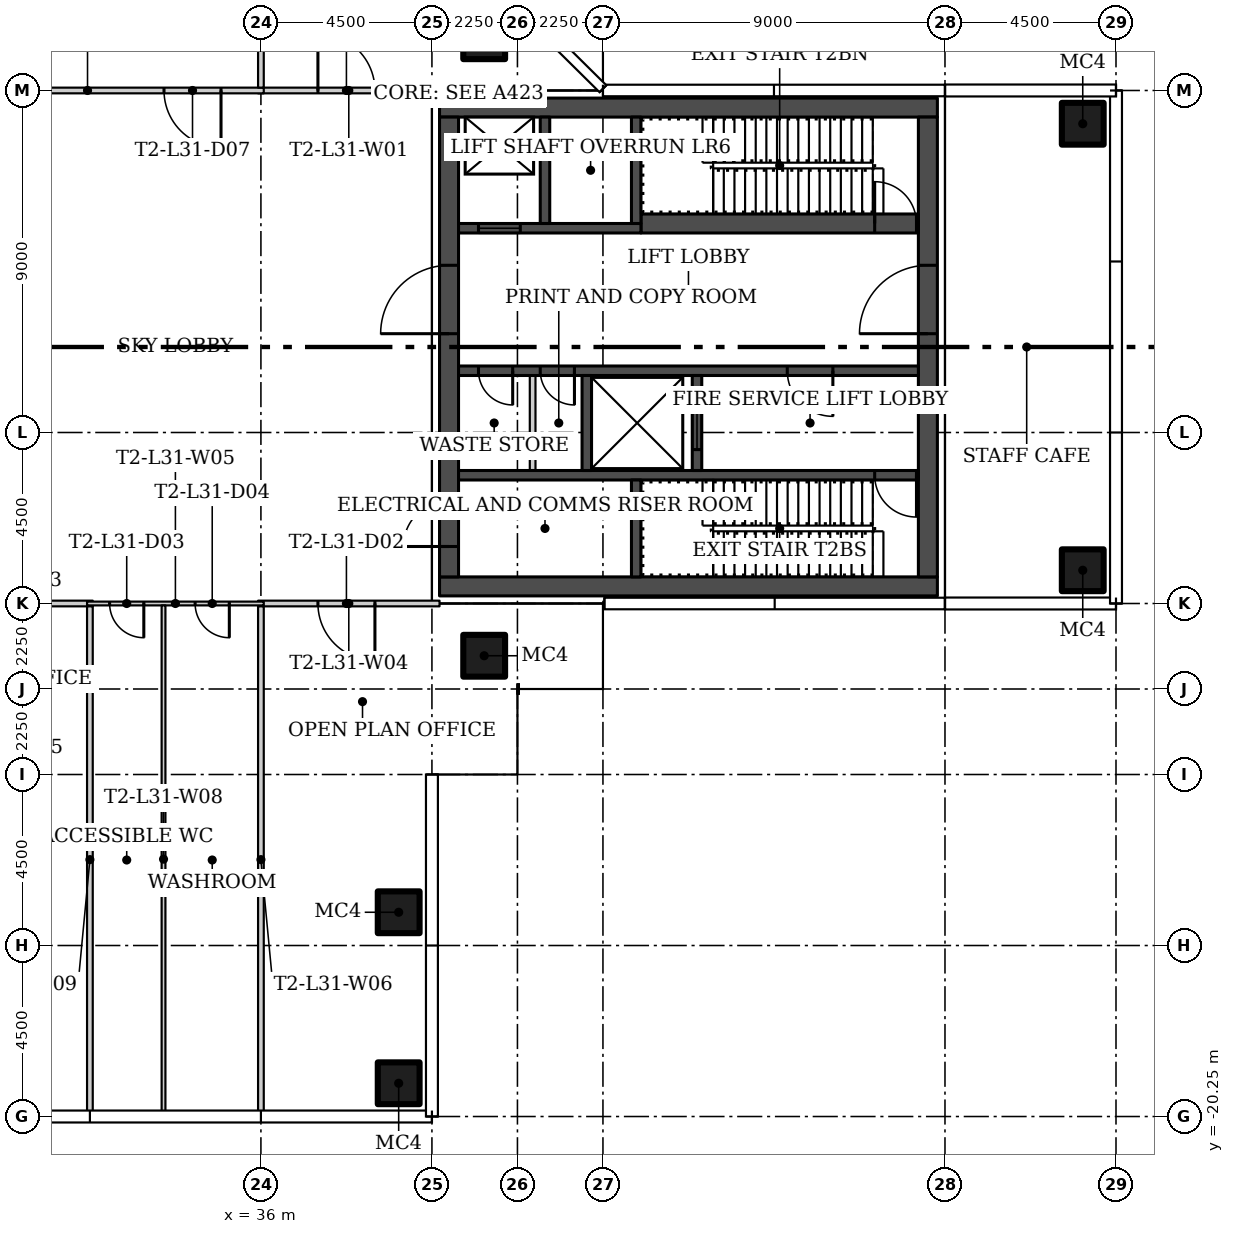
"""IFC4 building model, lengths in metres.
Left out: names, types, materials, properties, quantities, classifications, styles, units other than length and angle.
Written with IfcOpenShell. Run it as: python <this file> out.ifc"""

import sys

from ifc_helpers import new_model, si_unit, direction, frame, frame_2d, origin, origin_2d, place, context, subcontext, project, spatial, rectangle, hollow_rectangle, extrude, element, fill, save


model = new_model("IFC4")
c1 = context("Model", 3, precision=1e-05, world=origin(), true_north=direction((0.0, 1.0)))
c2 = subcontext(c1, "Body", "Model", "MODEL_VIEW")
j1 = project(units=[si_unit("LENGTHUNIT", "METRE"), si_unit("PLANEANGLEUNIT", "RADIAN")], contexts=[c1])
p1 = place(None, origin())
s1 = spatial("IfcSite", under=j1, at=p1, CompositionType="ELEMENT")
p2 = place(p1, origin())
s2 = spatial("IfcBuilding", under=s1, at=p2, CompositionType="ELEMENT")
p3 = place(p2, frame((0.0, 0.0, 133.5)))
s3 = spatial("IfcBuildingStorey", under=s2, at=p3, CompositionType="ELEMENT", Elevation=133.5)
for number, where in (
    (1, (41.875, 8.125, 0.0)),
    (2, (41.875, -8.125, 0.0)),
    (3, (39.625, -14.875, 0.0)),
    (4, (39.625, -19.375, 0.0)),
    (5, (57.625, -5.875, 0.0)),
    (6, (57.625, 5.875, 0.0)),
):
    element("IfcColumn", number, at=place(p3, frame(where)), inside=s3, PredefinedType="COLUMN", context=c2, shape_type="SweptSolid", body=[
        extrude(hollow_rectangle(XDim=1.1, YDim=1.1, WallThickness=0.04, at=origin_2d()), origin(), (0.0, 0.0, 1.0), 5.05),
    ])
p4 = place(p3, frame((35.925, 6.75, 0.0)))
e7 = element("IfcWall", 7, at=p4, inside=s3, PredefinedType="PARTITIONING", context=c2, shape_type="SweptSolid", body=[
    extrude(rectangle(XDim=4.775, YDim=0.15, at=frame_2d((2.387, 0.0))), origin(), (0.0, 0.0, 1.0), 5.05),
])
p5 = place(p4, frame((1.575, 0.0, 0.0)))
e8 = element("IfcOpeningElement", 8, at=p5, cuts=e7, PredefinedType="OPENING", context=c2, shape_type="SweptSolid", body=[
    extrude(rectangle(XDim=1.5, YDim=2.1, at=frame_2d((0.75, 1.05))), frame((0.0, 0.085, 0.0), z_axis=(0.0, -1.0, 0.0), x_axis=(1.0, 0.0, 0.0)), (0.0, 0.0, 1.0), 0.17),
])
p6 = place(p3, frame((36.075, 6.75, 0.0), z_axis=(0.0, 0.0, 1.0), x_axis=(-1.0, 0.0, 0.0)))
e9 = element("IfcWall", 9, at=p6, inside=s3, PredefinedType="PARTITIONING", context=c2, shape_type="SweptSolid", body=[
    extrude(rectangle(XDim=9.275, YDim=0.15, at=frame_2d((4.637, 0.0))), origin(), (0.0, 0.0, 1.0), 5.05),
])
p7 = place(p6, frame((6.525, 0.0, 0.0)))
e10 = element("IfcOpeningElement", 10, at=p7, cuts=e9, PredefinedType="OPENING", context=c2, shape_type="SweptSolid", body=[
    extrude(rectangle(XDim=1.5, YDim=2.1, at=frame_2d((0.75, 1.05))), frame((0.0, 0.085, 0.0), z_axis=(0.0, -1.0, 0.0), x_axis=(1.0, 0.0, 0.0)), (0.0, 0.0, 1.0), 0.17),
])
p8 = place(p6, frame((1.125, 0.0, 0.0)))
e11 = element("IfcOpeningElement", 11, at=p8, cuts=e9, PredefinedType="OPENING", context=c2, shape_type="SweptSolid", body=[
    extrude(rectangle(XDim=1.5, YDim=2.1, at=frame_2d((0.75, 1.05))), frame((0.0, 0.085, 0.0), z_axis=(0.0, -1.0, 0.0), x_axis=(1.0, 0.0, 0.0)), (0.0, 0.0, 1.0), 0.17),
])
p9 = place(p3, frame((31.575, -6.75, 0.0), z_axis=(0.0, 0.0, 1.0), x_axis=(-1.0, 0.0, 0.0)))
e12 = element("IfcWall", 12, at=p9, inside=s3, PredefinedType="PARTITIONING", context=c2, shape_type="SweptSolid", body=[
    extrude(rectangle(XDim=4.775, YDim=0.15, at=frame_2d((2.387, 0.0))), origin(), (0.0, 0.0, 1.0), 5.05),
])
p10 = place(p9, frame((1.575, 0.0, 0.0)))
e13 = element("IfcOpeningElement", 13, at=p10, cuts=e12, PredefinedType="OPENING", context=c2, shape_type="SweptSolid", body=[
    extrude(rectangle(XDim=1.5, YDim=2.1, at=frame_2d((0.75, 1.05))), frame((0.0, 0.085, 0.0), z_axis=(0.0, -1.0, 0.0), x_axis=(1.0, 0.0, 0.0)), (0.0, 0.0, 1.0), 0.17),
])
p11 = place(p3, frame((40.7, -6.75, 0.0), z_axis=(0.0, 0.0, 1.0), x_axis=(-1.0, 0.0, 0.0)))
e14 = element("IfcWall", 14, at=p11, inside=s3, PredefinedType="PARTITIONING", context=c2, shape_type="SweptSolid", body=[
    extrude(rectangle(XDim=4.775, YDim=0.15, at=frame_2d((2.387, 0.0))), origin(), (0.0, 0.0, 1.0), 5.05),
])
p12 = place(p11, frame((1.7, 0.0, 0.0)))
e15 = element("IfcOpeningElement", 15, at=p12, cuts=e14, PredefinedType="OPENING", context=c2, shape_type="SweptSolid", body=[
    extrude(rectangle(XDim=1.5, YDim=2.1, at=frame_2d((0.75, 1.05))), frame((0.0, 0.085, 0.0), z_axis=(0.0, -1.0, 0.0), x_axis=(1.0, 0.0, 0.0)), (0.0, 0.0, 1.0), 0.17),
])
p13 = place(p3, frame((36.075, -6.75, 0.0), z_axis=(0.0, 0.0, 1.0), x_axis=(-1.0, 0.0, 0.0)))
e16 = element("IfcWall", 16, at=p13, inside=s3, PredefinedType="PARTITIONING", context=c2, shape_type="SweptSolid", body=[
    extrude(rectangle(XDim=4.65, YDim=0.1, at=frame_2d((2.325, 0.0))), origin(), (0.0, 0.0, 1.0), 5.05),
])
p14 = place(p13, frame((3.156, 0.0, 0.0)))
e17 = element("IfcOpeningElement", 17, at=p14, cuts=e16, PredefinedType="OPENING", context=c2, shape_type="SweptSolid", body=[
    extrude(rectangle(XDim=0.9, YDim=2.1, at=frame_2d((0.45, 1.05))), frame((0.0, 0.06, 0.0), z_axis=(0.0, -1.0, 0.0), x_axis=(1.0, 0.0, 0.0)), (0.0, 0.0, 1.0), 0.12),
])
p15 = place(p13, frame((0.906, 0.0, 0.0)))
e18 = element("IfcOpeningElement", 18, at=p15, cuts=e16, PredefinedType="OPENING", context=c2, shape_type="SweptSolid", body=[
    extrude(rectangle(XDim=0.9, YDim=2.1, at=frame_2d((0.45, 1.05))), frame((0.0, 0.06, 0.0), z_axis=(0.0, -1.0, 0.0), x_axis=(1.0, 0.0, 0.0)), (0.0, 0.0, 1.0), 0.12),
])
for number, where, z_axis, x_axis in (
    (19, (36.0, -6.825, 0.0), (0.0, 0.0, 1.0), (0.0, -1.0, 0.0)),
    (20, (36.0, 20.155, 0.0), (0.0, 0.0, 1.0), (0.0, -1.0, 0.0)),
):
    element("IfcWall", number, at=place(p3, frame(where, z_axis=z_axis, x_axis=x_axis)), inside=s3, PredefinedType="PARTITIONING", context=c2, shape_type="SweptSolid", body=[
        extrude(rectangle(XDim=13.33, YDim=0.15, at=frame_2d((6.665, 0.0))), origin(), (0.0, 0.0, 1.0), 5.05),
    ])
p16 = place(p3, frame((33.438, -6.8, 0.0), z_axis=(0.0, 0.0, 1.0), x_axis=(0.0, -1.0, 0.0)))
e21 = element("IfcWall", 21, at=p16, inside=s3, PredefinedType="PARTITIONING", context=c2, shape_type="SweptSolid", body=[
    extrude(rectangle(XDim=13.355, YDim=0.1, at=frame_2d((6.677, 0.0))), origin(), (0.0, 0.0, 1.0), 5.05),
])
p17 = place(p3, frame((31.5, -6.825, 0.0), z_axis=(0.0, 0.0, 1.0), x_axis=(0.0, -1.0, 0.0)))
e22 = element("IfcWall", 22, at=p17, inside=s3, PredefinedType="PARTITIONING", context=c2, shape_type="SweptSolid", body=[
    extrude(rectangle(XDim=13.33, YDim=0.15, at=frame_2d((6.665, 0.0))), origin(), (0.0, 0.0, 1.0), 5.05),
])
for number, where, z_axis, x_axis in (
    (23, (53.8, -6.3, 0.0), (0.0, 0.0, 1.0), (-1.0, 0.0, 0.0)),
    (24, (53.8, 6.3, 0.0), (0.0, 0.0, 1.0), (-1.0, 0.0, 0.0)),
):
    element("IfcWall", number, at=place(p3, frame(where, z_axis=z_axis, x_axis=x_axis)), inside=s3, PredefinedType="SHEAR", context=c2, shape_type="SweptSolid", body=[
        extrude(rectangle(XDim=13.1, YDim=0.5, at=frame_2d((6.55, 0.0))), origin(), (0.0, 0.0, 1.0), 5.05),
    ])
p18 = place(p3, frame((53.55, -6.05, 0.0), z_axis=(0.0, 0.0, 1.0), x_axis=(0.0, 1.0, 0.0)))
e25 = element("IfcWall", 25, at=p18, inside=s3, PredefinedType="SHEAR", context=c2, shape_type="SweptSolid", body=[
    extrude(rectangle(XDim=12.1, YDim=0.5, at=frame_2d((6.05, 0.0))), origin(), (0.0, 0.0, 1.0), 5.05),
])
p19 = place(p18, frame((6.4, 0.0, 0.0)))
e26 = element("IfcOpeningElement", 26, at=p19, cuts=e25, PredefinedType="OPENING", context=c2, shape_type="SweptSolid", body=[
    extrude(rectangle(XDim=1.8, YDim=2.4, at=frame_2d((0.9, 1.2))), frame((0.0, 0.26, 0.0), z_axis=(0.0, -1.0, 0.0), x_axis=(1.0, 0.0, 0.0)), (0.0, 0.0, 1.0), 0.52),
])
p20 = place(p3, frame((40.95, -6.05, 0.0), z_axis=(0.0, 0.0, 1.0), x_axis=(0.0, 1.0, 0.0)))
e27 = element("IfcWall", 27, at=p20, inside=s3, PredefinedType="SHEAR", context=c2, shape_type="SweptSolid", body=[
    extrude(rectangle(XDim=12.1, YDim=0.5, at=frame_2d((6.05, 0.0))), origin(), (0.0, 0.0, 1.0), 5.05),
])
p21 = place(p20, frame((0.8, 0.0, 0.0)))
e28 = element("IfcOpeningElement", 28, at=p21, cuts=e27, PredefinedType="OPENING", context=c2, shape_type="SweptSolid", body=[
    extrude(rectangle(XDim=1.2, YDim=2.1, at=frame_2d((0.6, 1.05))), frame((0.0, 0.26, 0.0), z_axis=(0.0, -1.0, 0.0), x_axis=(1.0, 0.0, 0.0)), (0.0, 0.0, 1.0), 0.52),
])
p22 = place(p20, frame((6.4, 0.0, 0.0)))
e29 = element("IfcOpeningElement", 29, at=p22, cuts=e27, PredefinedType="OPENING", context=c2, shape_type="SweptSolid", body=[
    extrude(rectangle(XDim=1.8, YDim=2.4, at=frame_2d((0.9, 1.2))), frame((0.0, 0.26, 0.0), z_axis=(0.0, -1.0, 0.0), x_axis=(1.0, 0.0, 0.0)), (0.0, 0.0, 1.0), 0.52),
])
p23 = place(p3, frame((53.3, -3.375, 0.0), z_axis=(0.0, 0.0, 1.0), x_axis=(-1.0, 0.0, 0.0)))
e30 = element("IfcWall", 30, at=p23, inside=s3, PredefinedType="SHEAR", context=c2, shape_type="SweptSolid", body=[
    extrude(rectangle(XDim=12.1, YDim=0.25, at=frame_2d((6.05, 0.0))), origin(), (0.0, 0.0, 1.0), 5.05),
])
p24 = place(p23, frame((0.05, 0.0, 0.0)))
e31 = element("IfcOpeningElement", 31, at=p24, cuts=e30, PredefinedType="OPENING", context=c2, shape_type="SweptSolid", body=[
    extrude(rectangle(XDim=1.1, YDim=2.1, at=frame_2d((0.55, 1.05))), frame((0.0, 0.135, 0.0), z_axis=(0.0, -1.0, 0.0), x_axis=(1.0, 0.0, 0.0)), (0.0, 0.0, 1.0), 0.27),
])
p25 = place(p3, frame((45.875, -6.05, 0.0), z_axis=(0.0, 0.0, 1.0), x_axis=(0.0, 1.0, 0.0)))
e32 = element("IfcWall", 32, at=p25, inside=s3, PredefinedType="SHEAR", context=c2, shape_type="SweptSolid", body=[
    extrude(rectangle(XDim=2.55, YDim=0.25, at=frame_2d((1.275, 0.0))), origin(), (0.0, 0.0, 1.0), 5.05),
])
p26 = place(p3, frame((53.3, -0.625, 0.0), z_axis=(0.0, 0.0, 1.0), x_axis=(-1.0, 0.0, 0.0)))
e33 = element("IfcWall", 33, at=p26, inside=s3, PredefinedType="SHEAR", context=c2, shape_type="SweptSolid", body=[
    extrude(rectangle(XDim=12.1, YDim=0.25, at=frame_2d((6.05, 0.0))), origin(), (0.0, 0.0, 1.0), 5.05),
])
p27 = place(p26, frame((2.25, 0.0, 0.0)))
e34 = element("IfcOpeningElement", 34, at=p27, cuts=e33, PredefinedType="OPENING", context=c2, shape_type="SweptSolid", body=[
    extrude(rectangle(XDim=1.2, YDim=2.1, at=frame_2d((0.6, 1.05))), frame((0.0, 0.135, 0.0), z_axis=(0.0, -1.0, 0.0), x_axis=(1.0, 0.0, 0.0)), (0.0, 0.0, 1.0), 0.27),
])
p28 = place(p26, frame((9.05, 0.0, 0.0)))
e35 = element("IfcOpeningElement", 35, at=p28, cuts=e33, PredefinedType="OPENING", context=c2, shape_type="SweptSolid", body=[
    extrude(rectangle(XDim=0.9, YDim=2.1, at=frame_2d((0.45, 1.05))), frame((0.0, 0.135, 0.0), z_axis=(0.0, -1.0, 0.0), x_axis=(1.0, 0.0, 0.0)), (0.0, 0.0, 1.0), 0.27),
])
p29 = place(p26, frame((10.675, 0.0, 0.0)))
e36 = element("IfcOpeningElement", 36, at=p29, cuts=e33, PredefinedType="OPENING", context=c2, shape_type="SweptSolid", body=[
    extrude(rectangle(XDim=0.9, YDim=2.1, at=frame_2d((0.45, 1.05))), frame((0.0, 0.135, 0.0), z_axis=(0.0, -1.0, 0.0), x_axis=(1.0, 0.0, 0.0)), (0.0, 0.0, 1.0), 0.27),
])
p30 = place(p3, frame((47.475, -3.25, 0.0), z_axis=(0.0, 0.0, 1.0), x_axis=(0.0, 1.0, 0.0)))
e37 = element("IfcWall", 37, at=p30, inside=s3, PredefinedType="SHEAR", context=c2, shape_type="SweptSolid", body=[
    extrude(rectangle(XDim=2.5, YDim=0.25, at=frame_2d((1.25, 0.0))), origin(), (0.0, 0.0, 1.0), 5.05),
])
p31 = place(p30, frame((0.55, 0.0, 0.0)))
e38 = element("IfcOpeningElement", 38, at=p31, cuts=e37, PredefinedType="OPENING", context=c2, shape_type="SweptSolid", body=[
    extrude(rectangle(XDim=1.4, YDim=2.4, at=frame_2d((0.7, 1.2))), frame((0.0, 0.135, 0.0), z_axis=(0.0, -1.0, 0.0), x_axis=(1.0, 0.0, 0.0)), (0.0, 0.0, 1.0), 0.27),
])
p32 = place(p3, frame((44.575, -3.25, 0.0), z_axis=(0.0, 0.0, 1.0), x_axis=(0.0, 1.0, 0.0)))
e39 = element("IfcWall", 39, at=p32, inside=s3, PredefinedType="SHEAR", context=c2, shape_type="SweptSolid", body=[
    extrude(rectangle(XDim=2.5, YDim=0.25, at=frame_2d((1.25, 0.0))), origin(), (0.0, 0.0, 1.0), 5.05),
])
p33 = place(p3, frame((43.15, -3.25, 0.0), z_axis=(0.0, 0.0, 1.0), x_axis=(0.0, 1.0, 0.0)))
e40 = element("IfcWall", 40, at=p33, inside=s3, PredefinedType="PARTITIONING", context=c2, shape_type="SweptSolid", body=[
    extrude(rectangle(XDim=2.5, YDim=0.15, at=frame_2d((1.25, 0.0))), origin(), (0.0, 0.0, 1.0), 5.05),
])
p34 = place(p3, frame((46.0, 3.25, 0.0)))
e41 = element("IfcWall", 41, at=p34, inside=s3, PredefinedType="SHEAR", context=c2, shape_type="SweptSolid", body=[
    extrude(rectangle(XDim=7.3, YDim=0.5, at=frame_2d((3.65, 0.0))), origin(), (0.0, 0.0, 1.0), 5.05),
])
p35 = place(p34, frame((6.15, 0.0, 0.0)))
e42 = element("IfcOpeningElement", 42, at=p35, cuts=e41, PredefinedType="OPENING", context=c2, shape_type="SweptSolid", body=[
    extrude(rectangle(XDim=1.1, YDim=2.1, at=frame_2d((0.55, 1.05))), frame((0.0, 0.26, 0.0), z_axis=(0.0, -1.0, 0.0), x_axis=(1.0, 0.0, 0.0)), (0.0, 0.0, 1.0), 0.52),
])
p36 = place(p3, frame((46.0, 3.125, 0.0), z_axis=(0.0, 0.0, 1.0), x_axis=(-1.0, 0.0, 0.0)))
e43 = element("IfcWall", 43, at=p36, inside=s3, PredefinedType="SHEAR", context=c2, shape_type="SweptSolid", body=[
    extrude(rectangle(XDim=4.8, YDim=0.25, at=frame_2d((2.4, 0.0))), origin(), (0.0, 0.0, 1.0), 5.05),
])
p37 = place(p36, frame((3.175, 0.0, 0.0)))
e44 = element("IfcOpeningElement", 44, at=p37, cuts=e43, PredefinedType="OPENING", context=c2, shape_type="SweptSolid", body=[
    extrude(rectangle(XDim=1.1, YDim=2.1, at=frame_2d((0.55, 1.05))), frame((0.0, 0.135, 0.0), z_axis=(0.0, -1.0, 0.0), x_axis=(1.0, 0.0, 0.0)), (0.0, 0.0, 1.0), 0.27),
])
for number, where, z_axis, x_axis in (
    (45, (45.875, 3.25, 0.0), (0.0, 0.0, 1.0), (0.0, 1.0, 0.0)),
    (46, (43.475, 3.25, 0.0), (0.0, 0.0, 1.0), (0.0, 1.0, 0.0)),
):
    element("IfcWall", number, at=place(p3, frame(where, z_axis=z_axis, x_axis=x_axis)), inside=s3, PredefinedType="SHEAR", context=c2, shape_type="SweptSolid", body=[
        extrude(rectangle(XDim=2.8, YDim=0.25, at=frame_2d((1.4, 0.0))), origin(), (0.0, 0.0, 1.0), 5.05),
    ])
p38 = place(p5, origin())
e47 = element("IfcDoor", 47, at=p38, inside=s3, OperationType="DOUBLE_DOOR_SINGLE_SWING", PredefinedType="DOOR", context=c2, shape_type="SweptSolid", body=[
    extrude(rectangle(XDim=1.5, YDim=2.1, at=frame_2d((0.75, 1.05))), frame((0.0, 0.025, 0.0), z_axis=(0.0, -1.0, 0.0), x_axis=(1.0, 0.0, 0.0)), (0.0, 0.0, 1.0), 0.05),
])
fill(e8, e47)
p39 = place(p12, origin())
e48 = element("IfcDoor", 48, at=p39, inside=s3, OperationType="DOUBLE_DOOR_SINGLE_SWING", PredefinedType="DOOR", context=c2, shape_type="SweptSolid", body=[
    extrude(rectangle(XDim=1.5, YDim=2.1, at=frame_2d((0.75, 1.05))), frame((0.0, 0.025, 0.0), z_axis=(0.0, -1.0, 0.0), x_axis=(1.0, 0.0, 0.0)), (0.0, 0.0, 1.0), 0.05),
])
fill(e15, e48)
p40 = place(p14, origin())
e49 = element("IfcDoor", 49, at=p40, inside=s3, OperationType="SINGLE_SWING_RIGHT", PredefinedType="DOOR", context=c2, shape_type="SweptSolid", body=[
    extrude(rectangle(XDim=0.9, YDim=2.1, at=frame_2d((0.45, 1.05))), frame((0.0, 0.025, 0.0), z_axis=(0.0, -1.0, 0.0), x_axis=(1.0, 0.0, 0.0)), (0.0, 0.0, 1.0), 0.05),
])
fill(e17, e49)
p41 = place(p15, origin())
e50 = element("IfcDoor", 50, at=p41, inside=s3, OperationType="SINGLE_SWING_RIGHT", PredefinedType="DOOR", context=c2, shape_type="SweptSolid", body=[
    extrude(rectangle(XDim=0.9, YDim=2.1, at=frame_2d((0.45, 1.05))), frame((0.0, 0.025, 0.0), z_axis=(0.0, -1.0, 0.0), x_axis=(1.0, 0.0, 0.0)), (0.0, 0.0, 1.0), 0.05),
])
fill(e18, e50)
p42 = place(p8, origin())
e51 = element("IfcDoor", 51, at=p42, inside=s3, OperationType="DOUBLE_DOOR_SINGLE_SWING", PredefinedType="DOOR", context=c2, shape_type="SweptSolid", body=[
    extrude(rectangle(XDim=1.5, YDim=2.1, at=frame_2d((0.75, 1.05))), frame((0.0, 0.025, 0.0), z_axis=(0.0, -1.0, 0.0), x_axis=(1.0, 0.0, 0.0)), (0.0, 0.0, 1.0), 0.05),
])
fill(e11, e51)
p43 = place(p19, origin())
e52 = element("IfcDoor", 52, at=p43, inside=s3, OperationType="DOUBLE_DOOR_SINGLE_SWING", PredefinedType="DOOR", context=c2, shape_type="SweptSolid", body=[
    extrude(rectangle(XDim=1.8, YDim=2.4, at=frame_2d((0.9, 1.2))), frame((0.0, 0.025, 0.0), z_axis=(0.0, -1.0, 0.0), x_axis=(1.0, 0.0, 0.0)), (0.0, 0.0, 1.0), 0.05),
])
fill(e26, e52)
p44 = place(p21, origin())
e53 = element("IfcDoor", 53, at=p44, inside=s3, OperationType="SINGLE_SWING_LEFT", PredefinedType="DOOR", context=c2, shape_type="SweptSolid", body=[
    extrude(rectangle(XDim=1.2, YDim=2.1, at=frame_2d((0.6, 1.05))), frame((0.0, 0.025, 0.0), z_axis=(0.0, -1.0, 0.0), x_axis=(1.0, 0.0, 0.0)), (0.0, 0.0, 1.0), 0.05),
])
fill(e28, e53)
p45 = place(p22, origin())
e54 = element("IfcDoor", 54, at=p45, inside=s3, OperationType="DOUBLE_DOOR_SINGLE_SWING", PredefinedType="DOOR", context=c2, shape_type="SweptSolid", body=[
    extrude(rectangle(XDim=1.8, YDim=2.4, at=frame_2d((0.9, 1.2))), frame((0.0, 0.025, 0.0), z_axis=(0.0, -1.0, 0.0), x_axis=(1.0, 0.0, 0.0)), (0.0, 0.0, 1.0), 0.05),
])
fill(e29, e54)
p46 = place(p24, origin())
e55 = element("IfcDoor", 55, at=p46, inside=s3, OperationType="SINGLE_SWING_LEFT", PredefinedType="DOOR", context=c2, shape_type="SweptSolid", body=[
    extrude(rectangle(XDim=1.1, YDim=2.1, at=frame_2d((0.55, 1.05))), frame((0.0, 0.025, 0.0), z_axis=(0.0, -1.0, 0.0), x_axis=(1.0, 0.0, 0.0)), (0.0, 0.0, 1.0), 0.05),
])
fill(e31, e55)
p47 = place(p27, origin())
e56 = element("IfcDoor", 56, at=p47, inside=s3, OperationType="SINGLE_SWING_LEFT", PredefinedType="DOOR", context=c2, shape_type="SweptSolid", body=[
    extrude(rectangle(XDim=1.2, YDim=2.1, at=frame_2d((0.6, 1.05))), frame((0.0, 0.025, 0.0), z_axis=(0.0, -1.0, 0.0), x_axis=(1.0, 0.0, 0.0)), (0.0, 0.0, 1.0), 0.05),
])
fill(e34, e56)
p48 = place(p28, origin())
e57 = element("IfcDoor", 57, at=p48, inside=s3, OperationType="SINGLE_SWING_RIGHT", PredefinedType="DOOR", context=c2, shape_type="SweptSolid", body=[
    extrude(rectangle(XDim=0.9, YDim=2.1, at=frame_2d((0.45, 1.05))), frame((0.0, 0.025, 0.0), z_axis=(0.0, -1.0, 0.0), x_axis=(1.0, 0.0, 0.0)), (0.0, 0.0, 1.0), 0.05),
])
fill(e35, e57)
p49 = place(p29, origin())
e58 = element("IfcDoor", 58, at=p49, inside=s3, OperationType="SINGLE_SWING_RIGHT", PredefinedType="DOOR", context=c2, shape_type="SweptSolid", body=[
    extrude(rectangle(XDim=0.9, YDim=2.1, at=frame_2d((0.45, 1.05))), frame((0.0, 0.025, 0.0), z_axis=(0.0, -1.0, 0.0), x_axis=(1.0, 0.0, 0.0)), (0.0, 0.0, 1.0), 0.05),
])
fill(e36, e58)
p50 = place(p31, origin())
e59 = element("IfcDoor", 59, at=p50, inside=s3, OperationType="SLIDING_TO_LEFT", PredefinedType="DOOR", context=c2, shape_type="SweptSolid", body=[
    extrude(rectangle(XDim=1.4, YDim=2.4, at=frame_2d((0.7, 1.2))), frame((0.0, 0.025, 0.0), z_axis=(0.0, -1.0, 0.0), x_axis=(1.0, 0.0, 0.0)), (0.0, 0.0, 1.0), 0.05),
])
fill(e38, e59)
p51 = place(p35, origin())
e60 = element("IfcDoor", 60, at=p51, inside=s3, OperationType="SINGLE_SWING_RIGHT", PredefinedType="DOOR", context=c2, shape_type="SweptSolid", body=[
    extrude(rectangle(XDim=1.1, YDim=2.1, at=frame_2d((0.55, 1.05))), frame((0.0, 0.025, 0.0), z_axis=(0.0, -1.0, 0.0), x_axis=(1.0, 0.0, 0.0)), (0.0, 0.0, 1.0), 0.05),
])
fill(e42, e60)
p52 = place(p37, origin())
e61 = element("IfcDoor", 61, at=p52, inside=s3, OperationType="SLIDING_TO_LEFT", PredefinedType="DOOR", context=c2, shape_type="SweptSolid", body=[
    extrude(rectangle(XDim=1.1, YDim=2.1, at=frame_2d((0.55, 1.05))), frame((0.0, 0.025, 0.0), z_axis=(0.0, -1.0, 0.0), x_axis=(1.0, 0.0, 0.0)), (0.0, 0.0, 1.0), 0.05),
])
fill(e44, e61)
save(model, sys.argv[1])
